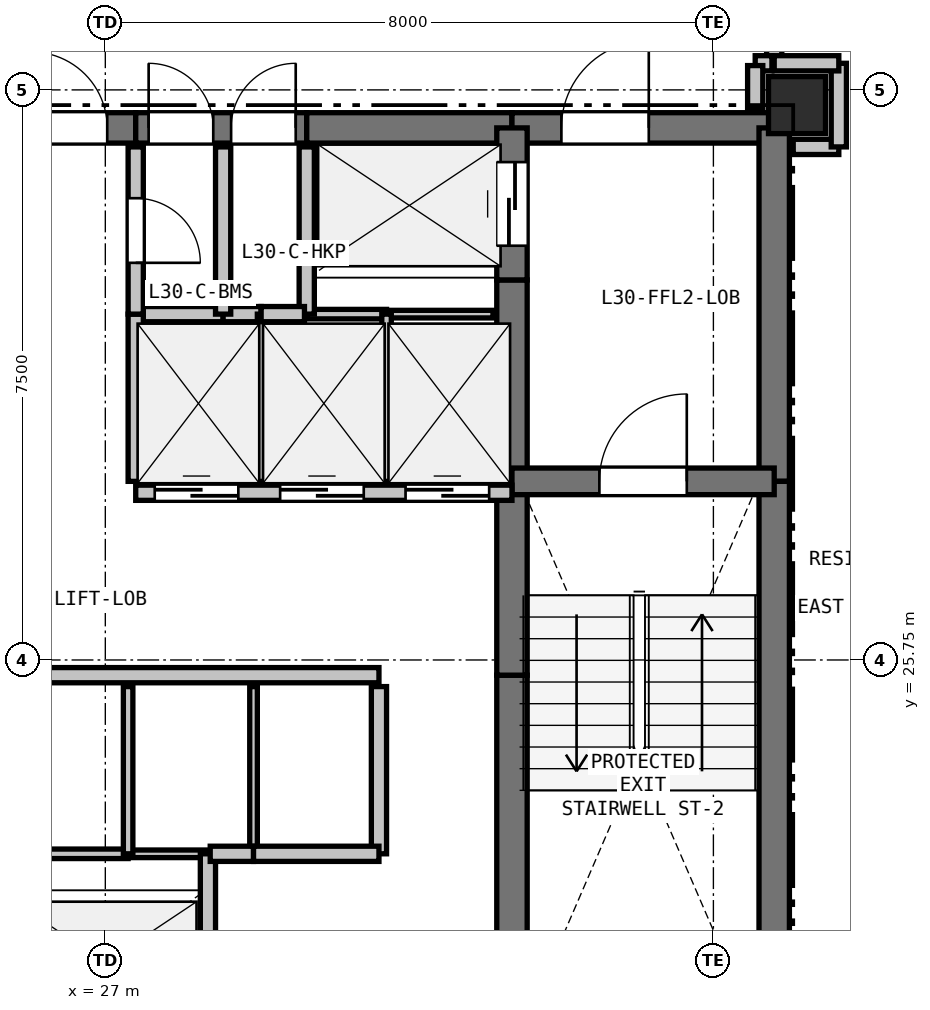
"""IFC4 building model, lengths in metres.
Left out: names, types, materials, properties, quantities, classifications, styles, units other than length and angle.
Written with IfcOpenShell. Run it as: python <this file> out.ifc"""

import sys

from ifc_helpers import new_model, si_unit, direction, frame, frame_2d, origin, origin_2d, place, context, subcontext, project, spatial, rectangle, extrude, element, fill, save


model = new_model("IFC4")
c1 = context("Model", 3, precision=1e-05, world=origin(), true_north=direction((0.0, 1.0)))
c2 = subcontext(c1, "Body", "Model", "MODEL_VIEW")
j1 = project(units=[si_unit("LENGTHUNIT", "METRE"), si_unit("PLANEANGLEUNIT", "RADIAN")], contexts=[c1])
p1 = place(None, origin())
s1 = spatial("IfcSite", under=j1, at=p1, CompositionType="ELEMENT")
p2 = place(p1, origin())
s2 = spatial("IfcBuilding", under=s1, at=p2, CompositionType="ELEMENT")
p3 = place(p2, frame((0.0, 0.0, 109.8)))
s3 = spatial("IfcBuildingStorey", under=s2, at=p3, CompositionType="ELEMENT", Elevation=109.8)
p4 = place(p3, frame((36.1, 33.05, 0.0), z_axis=(0.0, 0.0, 1.0), x_axis=(1.0, 0.0, 0.0)))
e1 = element("IfcColumn", 1, at=p4, inside=s3, PredefinedType="COLUMN", context=c2, shape_type="SweptSolid", body=[
    extrude(rectangle(XDim=0.75, YDim=0.75, at=origin_2d()), origin(), (0.0, 0.0, 1.0), 3.3),
])
p5 = place(p3, frame((25.65, 32.75, 0.0), z_axis=(0.0, 0.0, 1.0), x_axis=(1.0, 0.0, 0.0)))
e2 = element("IfcWall", 2, at=p5, inside=s3, PredefinedType="SHEAR", context=c2, shape_type="SweptSolid", body=[
    extrude(rectangle(XDim=1.75, YDim=0.4, at=frame_2d((0.875, 0.0))), origin(), (0.0, 0.0, 1.0), 3.05),
])
p6 = place(p5, frame((0.375, 0.0, 0.0)))
e3 = element("IfcOpeningElement", 3, at=p6, cuts=e2, PredefinedType="OPENING", context=c2, shape_type="SweptSolid", body=[
    extrude(rectangle(XDim=1.0, YDim=2.15, at=frame_2d((0.5, 1.075))), frame((0.0, 0.21, 0.0), z_axis=(0.0, -1.0, 0.0), x_axis=(1.0, 0.0, 0.0)), (0.0, 0.0, 1.0), 0.42),
])
p7 = place(p3, frame((27.4, 32.75, 0.0), z_axis=(0.0, 0.0, 1.0), x_axis=(1.0, 0.0, 0.0)))
e4 = element("IfcWall", 4, at=p7, inside=s3, PredefinedType="SHEAR", context=c2, shape_type="SweptSolid", body=[
    extrude(rectangle(XDim=2.25, YDim=0.4, at=frame_2d((1.125, 0.0))), origin(), (0.0, 0.0, 1.0), 3.05),
])
p8 = place(p7, frame((0.17, 0.0, 0.0)))
e5 = element("IfcOpeningElement", 5, at=p8, cuts=e4, PredefinedType="OPENING", context=c2, shape_type="SweptSolid", body=[
    extrude(rectangle(XDim=0.85, YDim=2.1, at=frame_2d((0.425, 1.05))), frame((0.0, 0.21, 0.0), z_axis=(0.0, -1.0, 0.0), x_axis=(1.0, 0.0, 0.0)), (0.0, 0.0, 1.0), 0.42),
])
p9 = place(p7, frame((1.255, 0.0, 0.0)))
e6 = element("IfcOpeningElement", 6, at=p9, cuts=e4, PredefinedType="OPENING", context=c2, shape_type="SweptSolid", body=[
    extrude(rectangle(XDim=0.85, YDim=2.1, at=frame_2d((0.425, 1.05))), frame((0.0, 0.21, 0.0), z_axis=(0.0, -1.0, 0.0), x_axis=(1.0, 0.0, 0.0)), (0.0, 0.0, 1.0), 0.42),
])
p10 = place(p3, frame((29.65, 32.75, 0.0), z_axis=(0.0, 0.0, 1.0), x_axis=(1.0, 0.0, 0.0)))
e7 = element("IfcWall", 7, at=p10, inside=s3, PredefinedType="SHEAR", context=c2, shape_type="SweptSolid", body=[
    extrude(rectangle(XDim=2.7, YDim=0.4, at=frame_2d((1.35, 0.0))), origin(), (0.0, 0.0, 1.0), 3.05),
])
p11 = place(p3, frame((32.35, 32.75, 0.0), z_axis=(0.0, 0.0, 1.0), x_axis=(1.0, 0.0, 0.0)))
e8 = element("IfcWall", 8, at=p11, inside=s3, PredefinedType="SHEAR", context=c2, shape_type="SweptSolid", body=[
    extrude(rectangle(XDim=3.45, YDim=0.4, at=frame_2d((1.725, 0.0))), origin(), (0.0, 0.0, 1.0), 3.05),
])
p12 = place(p11, frame((0.65, 0.0, 0.0)))
e9 = element("IfcOpeningElement", 9, at=p12, cuts=e8, PredefinedType="OPENING", context=c2, shape_type="SweptSolid", body=[
    extrude(rectangle(XDim=1.15, YDim=2.15, at=frame_2d((0.575, 1.075))), frame((0.0, 0.21, 0.0), z_axis=(0.0, -1.0, 0.0), x_axis=(1.0, 0.0, 0.0)), (0.0, 0.0, 1.0), 0.42),
])
p13 = place(p3, frame((35.8, 32.75, 0.0), z_axis=(0.0, 0.0, 1.0), x_axis=(0.0, -1.0, 0.0)))
e10 = element("IfcWall", 10, at=p13, inside=s3, PredefinedType="SHEAR", context=c2, shape_type="SweptSolid", body=[
    extrude(rectangle(XDim=4.65, YDim=0.4, at=frame_2d((2.325, 0.0))), origin(), (0.0, 0.0, 1.0), 3.05),
])
p14 = place(p3, frame((35.8, 28.1, 0.0), z_axis=(0.0, 0.0, 1.0), x_axis=(0.0, -1.0, 0.0)))
e11 = element("IfcWall", 11, at=p14, inside=s3, PredefinedType="SHEAR", context=c2, shape_type="SweptSolid", body=[
    extrude(rectangle(XDim=7.35, YDim=0.4, at=frame_2d((3.675, 0.0))), origin(), (0.0, 0.0, 1.0), 3.05),
])
p15 = place(p3, frame((32.35, 20.75, 0.0), z_axis=(0.0, 0.0, 1.0), x_axis=(0.0, 1.0, 0.0)))
e12 = element("IfcWall", 12, at=p15, inside=s3, PredefinedType="SHEAR", context=c2, shape_type="SweptSolid", body=[
    extrude(rectangle(XDim=4.8, YDim=0.4, at=frame_2d((2.4, 0.0))), origin(), (0.0, 0.0, 1.0), 3.05),
])
p16 = place(p3, frame((32.35, 25.55, 0.0), z_axis=(0.0, 0.0, 1.0), x_axis=(0.0, 1.0, 0.0)))
e13 = element("IfcWall", 13, at=p16, inside=s3, PredefinedType="SHEAR", context=c2, shape_type="SweptSolid", body=[
    extrude(rectangle(XDim=2.4, YDim=0.4, at=frame_2d((1.2, 0.0))), origin(), (0.0, 0.0, 1.0), 3.05),
])
p17 = place(p3, frame((32.35, 27.95, 0.0), z_axis=(0.0, 0.0, 1.0), x_axis=(0.0, 1.0, 0.0)))
e14 = element("IfcWall", 14, at=p17, inside=s3, PredefinedType="SHEAR", context=c2, shape_type="SweptSolid", body=[
    extrude(rectangle(XDim=2.8, YDim=0.4, at=frame_2d((1.4, 0.0))), origin(), (0.0, 0.0, 1.0), 3.05),
])
p18 = place(p3, frame((32.35, 30.75, 0.0), z_axis=(0.0, 0.0, 1.0), x_axis=(0.0, 1.0, 0.0)))
e15 = element("IfcWall", 15, at=p18, inside=s3, PredefinedType="SHEAR", context=c2, shape_type="SweptSolid", body=[
    extrude(rectangle(XDim=2.0, YDim=0.4, at=frame_2d((1.0, 0.0))), origin(), (0.0, 0.0, 1.0), 3.05),
])
p19 = place(p18, frame((0.45, 0.0, 0.0)))
e16 = element("IfcOpeningElement", 16, at=p19, cuts=e15, PredefinedType="OPENING", context=c2, shape_type="SweptSolid", body=[
    extrude(rectangle(XDim=1.1, YDim=2.15, at=frame_2d((0.55, 1.075))), frame((0.0, 0.21, 0.0), z_axis=(0.0, -1.0, 0.0), x_axis=(1.0, 0.0, 0.0)), (0.0, 0.0, 1.0), 0.42),
])
p20 = place(p3, frame((32.35, 28.1, 0.0), z_axis=(0.0, 0.0, 1.0), x_axis=(1.0, 0.0, 0.0)))
e17 = element("IfcWall", 17, at=p20, inside=s3, PredefinedType="SHEAR", context=c2, shape_type="SweptSolid", body=[
    extrude(rectangle(XDim=3.45, YDim=0.35, at=frame_2d((1.725, 0.0))), origin(), (0.0, 0.0, 1.0), 3.05),
])
p21 = place(p20, frame((1.15, 0.0, 0.0)))
e18 = element("IfcOpeningElement", 18, at=p21, cuts=e17, PredefinedType="OPENING", context=c2, shape_type="SweptSolid", body=[
    extrude(rectangle(XDim=1.15, YDim=2.15, at=frame_2d((0.575, 1.075))), frame((0.0, 0.185, 0.0), z_axis=(0.0, -1.0, 0.0), x_axis=(1.0, 0.0, 0.0)), (0.0, 0.0, 1.0), 0.37),
])
p22 = place(p3, frame((25.65, 25.55, 0.0), z_axis=(0.0, 0.0, 1.0), x_axis=(1.0, 0.0, 0.0)))
e19 = element("IfcWall", 19, at=p22, inside=s3, PredefinedType="PARTITIONING", context=c2, shape_type="SweptSolid", body=[
    extrude(rectangle(XDim=4.95, YDim=0.2, at=frame_2d((2.475, 0.0))), origin(), (0.0, 0.0, 1.0), 3.05),
])
p23 = place(p3, frame((27.4, 27.95, 0.0), z_axis=(0.0, 0.0, 1.0), x_axis=(1.0, 0.0, 0.0)))
e20 = element("IfcWall", 20, at=p23, inside=s3, PredefinedType="PARTITIONING", context=c2, shape_type="SweptSolid", body=[
    extrude(rectangle(XDim=4.95, YDim=0.2, at=frame_2d((2.475, 0.0))), origin(), (0.0, 0.0, 1.0), 3.05),
])
p24 = place(p23, frame((0.25, 0.0, 0.0)))
e21 = element("IfcOpeningElement", 21, at=p24, cuts=e20, PredefinedType="OPENING", context=c2, shape_type="SweptSolid", body=[
    extrude(rectangle(XDim=1.1, YDim=2.15, at=frame_2d((0.55, 1.075))), frame((0.0, 0.11, 0.0), z_axis=(0.0, -1.0, 0.0), x_axis=(1.0, 0.0, 0.0)), (0.0, 0.0, 1.0), 0.22),
])
p25 = place(p23, frame((1.9, 0.0, 0.0)))
e22 = element("IfcOpeningElement", 22, at=p25, cuts=e20, PredefinedType="OPENING", context=c2, shape_type="SweptSolid", body=[
    extrude(rectangle(XDim=1.1, YDim=2.15, at=frame_2d((0.55, 1.075))), frame((0.0, 0.11, 0.0), z_axis=(0.0, -1.0, 0.0), x_axis=(1.0, 0.0, 0.0)), (0.0, 0.0, 1.0), 0.22),
])
p26 = place(p23, frame((3.55, 0.0, 0.0)))
e23 = element("IfcOpeningElement", 23, at=p26, cuts=e20, PredefinedType="OPENING", context=c2, shape_type="SweptSolid", body=[
    extrude(rectangle(XDim=1.1, YDim=2.15, at=frame_2d((0.55, 1.075))), frame((0.0, 0.11, 0.0), z_axis=(0.0, -1.0, 0.0), x_axis=(1.0, 0.0, 0.0)), (0.0, 0.0, 1.0), 0.22),
])
p27 = place(p3, frame((25.9, 23.2, 0.0), z_axis=(0.0, 0.0, 1.0), x_axis=(1.0, 0.0, 0.0)))
e24 = element("IfcWall", 24, at=p27, inside=s3, PredefinedType="PARTITIONING", context=c2, shape_type="SweptSolid", body=[
    extrude(rectangle(XDim=1.4, YDim=0.125, at=frame_2d((0.7, 0.0))), origin(), (0.0, 0.0, 1.0), 3.05),
])
p28 = place(p3, frame((27.3, 23.2, 0.0), z_axis=(0.0, 0.0, 1.0), x_axis=(1.0, 0.0, 0.0)))
e25 = element("IfcWall", 25, at=p28, inside=s3, PredefinedType="PARTITIONING", context=c2, shape_type="SweptSolid", body=[
    extrude(rectangle(XDim=1.05, YDim=0.1, at=frame_2d((0.525, 0.0))), origin(), (0.0, 0.0, 1.0), 3.05),
])
p29 = place(p3, frame((28.35, 23.2, 0.0), z_axis=(0.0, 0.0, 1.0), x_axis=(0.0, -1.0, 0.0)))
e26 = element("IfcWall", 26, at=p29, inside=s3, PredefinedType="PARTITIONING", context=c2, shape_type="SweptSolid", body=[
    extrude(rectangle(XDim=2.2, YDim=0.2, at=frame_2d((1.1, 0.0))), origin(), (0.0, 0.0, 1.0), 3.05),
])
p30 = place(p3, frame((32.1, 30.3, 0.0), z_axis=(0.0, 0.0, 1.0), x_axis=(-1.0, 0.0, 0.0)))
e27 = element("IfcWall", 27, at=p30, inside=s3, PredefinedType="PARTITIONING", context=c2, shape_type="SweptSolid", body=[
    extrude(rectangle(XDim=1.4, YDim=0.1, at=frame_2d((0.7, 0.0))), origin(), (0.0, 0.0, 1.0), 3.05),
])
p31 = place(p3, frame((30.7, 30.3, 0.0), z_axis=(0.0, 0.0, 1.0), x_axis=(-1.0, 0.0, 0.0)))
e28 = element("IfcWall", 28, at=p31, inside=s3, PredefinedType="PARTITIONING", context=c2, shape_type="SweptSolid", body=[
    extrude(rectangle(XDim=1.05, YDim=0.125, at=frame_2d((0.525, 0.0))), origin(), (0.0, 0.0, 1.0), 3.05),
])
p32 = place(p3, frame((29.65, 30.3, 0.0), z_axis=(0.0, 0.0, 1.0), x_axis=(0.0, 1.0, 0.0)))
e29 = element("IfcWall", 29, at=p32, inside=s3, PredefinedType="PARTITIONING", context=c2, shape_type="SweptSolid", body=[
    extrude(rectangle(XDim=2.2, YDim=0.2, at=frame_2d((1.1, 0.0))), origin(), (0.0, 0.0, 1.0), 3.05),
])
p33 = place(p3, frame((27.3, 25.4, 0.0), z_axis=(0.0, 0.0, 1.0), x_axis=(0.0, -1.0, 0.0)))
e30 = element("IfcWall", 30, at=p33, inside=s3, PredefinedType="PARTITIONING", context=c2, shape_type="SweptSolid", body=[
    extrude(rectangle(XDim=2.2, YDim=0.125, at=frame_2d((1.1, 0.0))), origin(), (0.0, 0.0, 1.0), 3.05),
])
p34 = place(p3, frame((28.95, 25.4, 0.0), z_axis=(0.0, 0.0, 1.0), x_axis=(0.0, -1.0, 0.0)))
e31 = element("IfcWall", 31, at=p34, inside=s3, PredefinedType="PARTITIONING", context=c2, shape_type="SweptSolid", body=[
    extrude(rectangle(XDim=2.2, YDim=0.1, at=frame_2d((1.1, 0.0))), origin(), (0.0, 0.0, 1.0), 3.05),
])
p35 = place(p3, frame((28.95, 23.2, 0.0), z_axis=(0.0, 0.0, 1.0), x_axis=(-1.0, 0.0, 0.0)))
e32 = element("IfcWall", 32, at=p35, inside=s3, PredefinedType="PARTITIONING", context=c2, shape_type="SweptSolid", body=[
    extrude(rectangle(XDim=0.57, YDim=0.2, at=frame_2d((0.285, 0.0))), origin(), (0.0, 0.0, 1.0), 3.05),
])
p36 = place(p3, frame((30.6, 25.4, 0.0), z_axis=(0.0, 0.0, 1.0), x_axis=(0.0, -1.0, 0.0)))
e33 = element("IfcWall", 33, at=p36, inside=s3, PredefinedType="PARTITIONING", context=c2, shape_type="SweptSolid", body=[
    extrude(rectangle(XDim=2.2, YDim=0.2, at=frame_2d((1.1, 0.0))), origin(), (0.0, 0.0, 1.0), 3.05),
])
p37 = place(p3, frame((30.6, 23.2, 0.0), z_axis=(0.0, 0.0, 1.0), x_axis=(-1.0, 0.0, 0.0)))
e34 = element("IfcWall", 34, at=p37, inside=s3, PredefinedType="PARTITIONING", context=c2, shape_type="SweptSolid", body=[
    extrude(rectangle(XDim=1.65, YDim=0.2, at=frame_2d((0.825, 0.0))), origin(), (0.0, 0.0, 1.0), 3.05),
])
p38 = place(p3, frame((27.4, 30.3, 0.0), z_axis=(0.0, 0.0, 1.0), x_axis=(1.0, 0.0, 0.0)))
e35 = element("IfcWall", 35, at=p38, inside=s3, PredefinedType="PARTITIONING", context=c2, shape_type="SweptSolid", body=[
    extrude(rectangle(XDim=1.15, YDim=0.2, at=frame_2d((0.575, 0.0))), origin(), (0.0, 0.0, 1.0), 3.05),
])
p39 = place(p3, frame((28.55, 30.3, 0.0), z_axis=(0.0, 0.0, 1.0), x_axis=(1.0, 0.0, 0.0)))
e36 = element("IfcWall", 36, at=p39, inside=s3, PredefinedType="PARTITIONING", context=c2, shape_type="SweptSolid", body=[
    extrude(rectangle(XDim=0.5, YDim=0.2, at=frame_2d((0.25, 0.0))), origin(), (0.0, 0.0, 1.0), 3.05),
])
p40 = place(p3, frame((29.05, 30.3, 0.0), z_axis=(0.0, 0.0, 1.0), x_axis=(0.0, -1.0, 0.0)))
e37 = element("IfcWall", 37, at=p40, inside=s3, PredefinedType="PARTITIONING", context=c2, shape_type="SweptSolid", body=[
    extrude(rectangle(XDim=2.2, YDim=0.1, at=frame_2d((1.1, 0.0))), origin(), (0.0, 0.0, 1.0), 3.05),
])
p41 = place(p3, frame((27.4, 28.1, 0.0), z_axis=(0.0, 0.0, 1.0), x_axis=(0.0, 1.0, 0.0)))
e38 = element("IfcWall", 38, at=p41, inside=s3, PredefinedType="PARTITIONING", context=c2, shape_type="SweptSolid", body=[
    extrude(rectangle(XDim=2.2, YDim=0.2, at=frame_2d((1.1, 0.0))), origin(), (0.0, 0.0, 1.0), 3.05),
])
p42 = place(p3, frame((29.05, 30.3, 0.0), z_axis=(0.0, 0.0, 1.0), x_axis=(1.0, 0.0, 0.0)))
e39 = element("IfcWall", 39, at=p42, inside=s3, PredefinedType="PARTITIONING", context=c2, shape_type="SweptSolid", body=[
    extrude(rectangle(XDim=0.57, YDim=0.2, at=frame_2d((0.285, 0.0))), origin(), (0.0, 0.0, 1.0), 3.05),
])
p43 = place(p3, frame((30.7, 30.3, 0.0), z_axis=(0.0, 0.0, 1.0), x_axis=(0.0, -1.0, 0.0)))
e40 = element("IfcWall", 40, at=p43, inside=s3, PredefinedType="PARTITIONING", context=c2, shape_type="SweptSolid", body=[
    extrude(rectangle(XDim=2.2, YDim=0.125, at=frame_2d((1.1, 0.0))), origin(), (0.0, 0.0, 1.0), 3.05),
])
p44 = place(p3, frame((27.4, 32.5, 0.0), z_axis=(0.0, 0.0, 1.0), x_axis=(0.0, -1.0, 0.0)))
e41 = element("IfcWall", 41, at=p44, inside=s3, PredefinedType="PARTITIONING", context=c2, shape_type="SweptSolid", body=[
    extrude(rectangle(XDim=2.2, YDim=0.2, at=frame_2d((1.1, 0.0))), origin(), (0.0, 0.0, 1.0), 3.05),
])
p45 = place(p44, frame((0.675, 0.0, 0.0)))
e42 = element("IfcOpeningElement", 42, at=p45, cuts=e41, PredefinedType="OPENING", context=c2, shape_type="SweptSolid", body=[
    extrude(rectangle(XDim=0.85, YDim=2.1, at=frame_2d((0.425, 1.05))), frame((0.0, 0.11, 0.0), z_axis=(0.0, -1.0, 0.0), x_axis=(1.0, 0.0, 0.0)), (0.0, 0.0, 1.0), 0.22),
])
p46 = place(p3, frame((35.8, 35.35, 0.0), z_axis=(0.0, 0.0, 1.0), x_axis=(0.0, -1.0, 0.0)))
e43 = element("IfcWall", 43, at=p46, inside=s3, PredefinedType="PARTITIONING", context=c2, shape_type="SweptSolid", body=[
    extrude(rectangle(XDim=1.75, YDim=0.2, at=frame_2d((0.875, 0.0))), origin(), (0.0, 0.0, 1.0), 3.05),
])
p47 = place(p46, frame((0.375, 0.0, 0.0)))
e44 = element("IfcOpeningElement", 44, at=p47, cuts=e43, PredefinedType="OPENING", context=c2, shape_type="SweptSolid", body=[
    extrude(rectangle(XDim=1.0, YDim=2.15, at=frame_2d((0.5, 1.075))), frame((0.0, 0.11, 0.0), z_axis=(0.0, -1.0, 0.0), x_axis=(1.0, 0.0, 0.0)), (0.0, 0.0, 1.0), 0.22),
])
p48 = place(p3, frame((35.77, 33.6, 0.0), z_axis=(0.0, 0.0, 1.0), x_axis=(-1.0, 0.0, 0.0)))
e45 = element("IfcWall", 45, at=p48, inside=s3, PredefinedType="PARTITIONING", context=c2, shape_type="SweptSolid", body=[
    extrude(rectangle(XDim=0.22, YDim=0.2, at=frame_2d((0.11, 0.0))), origin(), (0.0, 0.0, 1.0), 3.05),
])
p49 = place(p3, frame((35.55, 33.57, 0.0), z_axis=(0.0, 0.0, 1.0), x_axis=(0.0, -1.0, 0.0)))
e46 = element("IfcWall", 46, at=p49, inside=s3, PredefinedType="PARTITIONING", context=c2, shape_type="SweptSolid", body=[
    extrude(rectangle(XDim=0.57, YDim=0.2, at=frame_2d((0.285, 0.0))), origin(), (0.0, 0.0, 1.0), 2.498),
])
p50 = place(p3, frame((36.05, 32.5, 0.0), z_axis=(0.0, 0.0, 1.0), x_axis=(1.0, 0.0, 0.0)))
e47 = element("IfcWall", 47, at=p50, inside=s3, PredefinedType="PARTITIONING", context=c2, shape_type="SweptSolid", body=[
    extrude(rectangle(XDim=0.6, YDim=0.2, at=frame_2d((0.3, 0.0))), origin(), (0.0, 0.0, 1.0), 2.498),
])
p51 = place(p3, frame((36.65, 32.5, 0.0), z_axis=(0.0, 0.0, 1.0), x_axis=(0.0, 1.0, 0.0)))
e48 = element("IfcWall", 48, at=p51, inside=s3, PredefinedType="PARTITIONING", context=c2, shape_type="SweptSolid", body=[
    extrude(rectangle(XDim=1.1, YDim=0.2, at=frame_2d((0.55, 0.0))), origin(), (0.0, 0.0, 1.0), 2.423),
])
p52 = place(p3, frame((36.65, 33.6, 0.0), z_axis=(0.0, 0.0, 1.0), x_axis=(-1.0, 0.0, 0.0)))
e49 = element("IfcWall", 49, at=p52, inside=s3, PredefinedType="PARTITIONING", context=c2, shape_type="SweptSolid", body=[
    extrude(rectangle(XDim=0.85, YDim=0.2, at=frame_2d((0.425, 0.0))), origin(), (0.0, 0.0, 1.0), 2.423),
])
p53 = place(p3, frame((28.55, 32.5, 0.0), z_axis=(0.0, 0.0, 1.0), x_axis=(0.0, -1.0, 0.0)))
e50 = element("IfcWall", 50, at=p53, inside=s3, PredefinedType="PARTITIONING", context=c2, shape_type="SweptSolid", body=[
    extrude(rectangle(XDim=2.2, YDim=0.2, at=frame_2d((1.1, 0.0))), origin(), (0.0, 0.0, 1.0), 3.05),
])
p54 = place(p24, origin())
e51 = element("IfcDoor", 51, at=p54, inside=s3, OperationType="SLIDING_TO_LEFT", PredefinedType="DOOR", context=c2, shape_type="SweptSolid", body=[
    extrude(rectangle(XDim=1.1, YDim=2.15, at=frame_2d((0.55, 1.075))), frame((0.0, 0.025, 0.0), z_axis=(0.0, -1.0, 0.0), x_axis=(1.0, 0.0, 0.0)), (0.0, 0.0, 1.0), 0.05),
])
fill(e21, e51)
p55 = place(p25, origin())
e52 = element("IfcDoor", 52, at=p55, inside=s3, OperationType="SLIDING_TO_LEFT", PredefinedType="DOOR", context=c2, shape_type="SweptSolid", body=[
    extrude(rectangle(XDim=1.1, YDim=2.15, at=frame_2d((0.55, 1.075))), frame((0.0, 0.025, 0.0), z_axis=(0.0, -1.0, 0.0), x_axis=(1.0, 0.0, 0.0)), (0.0, 0.0, 1.0), 0.05),
])
fill(e22, e52)
p56 = place(p26, origin())
e53 = element("IfcDoor", 53, at=p56, inside=s3, OperationType="SLIDING_TO_LEFT", PredefinedType="DOOR", context=c2, shape_type="SweptSolid", body=[
    extrude(rectangle(XDim=1.1, YDim=2.15, at=frame_2d((0.55, 1.075))), frame((0.0, 0.025, 0.0), z_axis=(0.0, -1.0, 0.0), x_axis=(1.0, 0.0, 0.0)), (0.0, 0.0, 1.0), 0.05),
])
fill(e23, e53)
p57 = place(p6, origin())
e54 = element("IfcDoor", 54, at=p57, inside=s3, OperationType="SINGLE_SWING_LEFT", PredefinedType="DOOR", context=c2, shape_type="SweptSolid", body=[
    extrude(rectangle(XDim=1.0, YDim=2.15, at=frame_2d((0.5, 1.075))), frame((0.0, 0.025, 0.0), z_axis=(0.0, -1.0, 0.0), x_axis=(1.0, 0.0, 0.0)), (0.0, 0.0, 1.0), 0.05),
])
fill(e3, e54)
p58 = place(p19, origin())
e55 = element("IfcDoor", 55, at=p58, inside=s3, OperationType="SLIDING_TO_LEFT", PredefinedType="DOOR", context=c2, shape_type="SweptSolid", body=[
    extrude(rectangle(XDim=1.1, YDim=2.15, at=frame_2d((0.55, 1.075))), frame((0.0, 0.025, 0.0), z_axis=(0.0, -1.0, 0.0), x_axis=(1.0, 0.0, 0.0)), (0.0, 0.0, 1.0), 0.05),
])
fill(e16, e55)
p59 = place(p21, origin())
e56 = element("IfcDoor", 56, at=p59, inside=s3, OperationType="SINGLE_SWING_RIGHT", PredefinedType="DOOR", context=c2, shape_type="SweptSolid", body=[
    extrude(rectangle(XDim=1.15, YDim=2.15, at=frame_2d((0.575, 1.075))), frame((0.0, 0.025, 0.0), z_axis=(0.0, -1.0, 0.0), x_axis=(1.0, 0.0, 0.0)), (0.0, 0.0, 1.0), 0.05),
])
fill(e18, e56)
p60 = place(p12, origin())
e57 = element("IfcDoor", 57, at=p60, inside=s3, OperationType="SINGLE_SWING_RIGHT", PredefinedType="DOOR", context=c2, shape_type="SweptSolid", body=[
    extrude(rectangle(XDim=1.15, YDim=2.15, at=frame_2d((0.575, 1.075))), frame((0.0, 0.025, 0.0), z_axis=(0.0, -1.0, 0.0), x_axis=(1.0, 0.0, 0.0)), (0.0, 0.0, 1.0), 0.05),
])
fill(e9, e57)
p61 = place(p45, origin())
e58 = element("IfcDoor", 58, at=p61, inside=s3, OperationType="SINGLE_SWING_RIGHT", PredefinedType="DOOR", context=c2, shape_type="SweptSolid", body=[
    extrude(rectangle(XDim=0.85, YDim=2.1, at=frame_2d((0.425, 1.05))), frame((0.0, 0.025, 0.0), z_axis=(0.0, -1.0, 0.0), x_axis=(1.0, 0.0, 0.0)), (0.0, 0.0, 1.0), 0.05),
])
fill(e42, e58)
p62 = place(p8, origin())
e59 = element("IfcDoor", 59, at=p62, inside=s3, OperationType="SINGLE_SWING_LEFT", PredefinedType="DOOR", context=c2, shape_type="SweptSolid", body=[
    extrude(rectangle(XDim=0.85, YDim=2.1, at=frame_2d((0.425, 1.05))), frame((0.0, 0.025, 0.0), z_axis=(0.0, -1.0, 0.0), x_axis=(1.0, 0.0, 0.0)), (0.0, 0.0, 1.0), 0.05),
])
fill(e5, e59)
p63 = place(p9, origin())
e60 = element("IfcDoor", 60, at=p63, inside=s3, OperationType="SINGLE_SWING_RIGHT", PredefinedType="DOOR", context=c2, shape_type="SweptSolid", body=[
    extrude(rectangle(XDim=0.85, YDim=2.1, at=frame_2d((0.425, 1.05))), frame((0.0, 0.025, 0.0), z_axis=(0.0, -1.0, 0.0), x_axis=(1.0, 0.0, 0.0)), (0.0, 0.0, 1.0), 0.05),
])
fill(e6, e60)
save(model, sys.argv[1])
